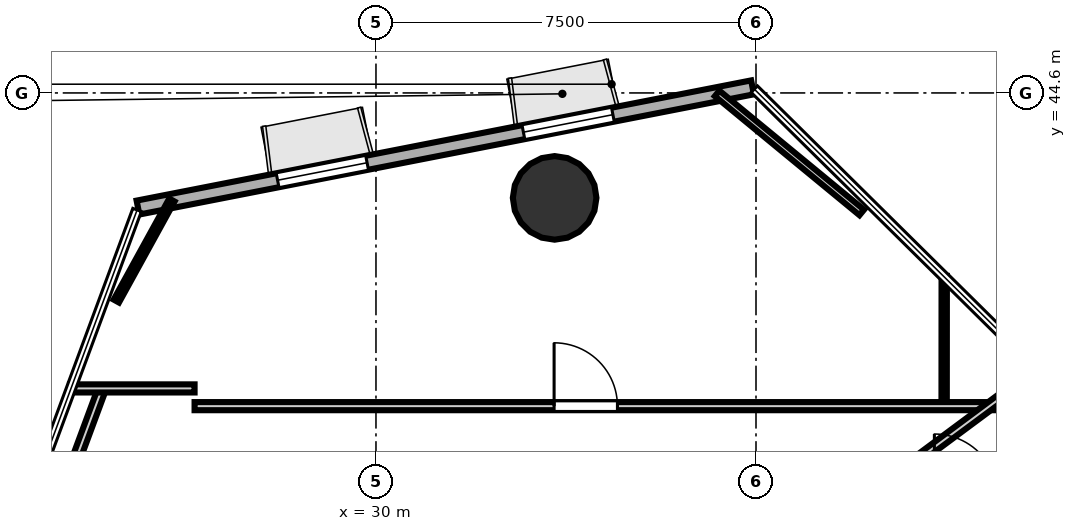
"""IFC4 building model, lengths in metres.
Left out: names, types, materials, properties, quantities, classifications, styles, units other than length and angle.
Written with IfcOpenShell. Run it as: python <this file> out.ifc"""

import sys

from ifc_helpers import new_model, si_unit, direction, frame, frame_2d, origin, origin_2d, place, context, subcontext, project, spatial, rectangle, hollow_circle, extrude, element, fill, save


model = new_model("IFC4")
c1 = context("Model", 3, precision=1e-05, world=origin(), true_north=direction((0.0, 1.0)))
c2 = subcontext(c1, "Body", "Model", "MODEL_VIEW")
j1 = project(units=[si_unit("LENGTHUNIT", "METRE"), si_unit("PLANEANGLEUNIT", "RADIAN")], contexts=[c1])
p1 = place(None, origin())
s1 = spatial("IfcSite", under=j1, at=p1, CompositionType="ELEMENT")
p2 = place(p1, origin())
s2 = spatial("IfcBuilding", under=s1, at=p2, CompositionType="ELEMENT")
p3 = place(p2, frame((0.0, 0.0, 59.9)))
s3 = spatial("IfcBuildingStorey", under=s2, at=p3, CompositionType="ELEMENT", Elevation=59.9)
p4 = place(p3, frame((33.526, 42.529, 0.0), z_axis=(0.0, 0.0, 1.0), x_axis=(1.0, 0.0, 0.0)))
e1 = element("IfcColumn", 1, at=p4, inside=s3, PredefinedType="COLUMN", context=c2, shape_type="SweptSolid", body=[
    extrude(hollow_circle(Radius=0.825, WallThickness=0.04, at=origin_2d()), origin(), (0.0, 0.0, 1.0), 3.7),
])
p5 = place(p3, frame((37.431, 44.71, 0.0), z_axis=(0.0, 0.0, 1.0), x_axis=(-0.981405358604, -0.191946664738, 0.0)))
e2 = element("IfcWall", 2, at=p5, inside=s3, PredefinedType="SOLIDWALL", context=c2, shape_type="SweptSolid", body=[
    extrude(rectangle(XDim=12.358, YDim=0.28, at=frame_2d((6.179, 0.0))), origin(), (0.0, 0.0, 1.0), 3.52),
])
p6 = place(p5, frame((2.807, 0.0, 0.85)))
e3 = element("IfcOpeningElement", 3, at=p6, cuts=e2, PredefinedType="OPENING", context=c2, shape_type="SweptSolid", body=[
    extrude(rectangle(XDim=1.8, YDim=2.1, at=frame_2d((0.9, 1.05))), frame((0.0, 0.15, 0.0), z_axis=(0.0, -1.0, 0.0), x_axis=(1.0, 0.0, 0.0)), (0.0, 0.0, 1.0), 0.3),
])
p7 = place(p5, frame((7.75, 0.0, 0.85)))
e4 = element("IfcOpeningElement", 4, at=p7, cuts=e2, PredefinedType="OPENING", context=c2, shape_type="SweptSolid", body=[
    extrude(rectangle(XDim=1.8, YDim=2.1, at=frame_2d((0.9, 1.05))), frame((0.0, 0.15, 0.0), z_axis=(0.0, -1.0, 0.0), x_axis=(1.0, 0.0, 0.0)), (0.0, 0.0, 1.0), 0.3),
])
p8 = place(p3, frame((23.579, 36.024, 0.0), z_axis=(0.0, 0.0, 1.0), x_axis=(0.347228067306, 0.93778071492, 0.0)))
e5 = element("IfcWall", 5, at=p8, inside=s3, PredefinedType="PARTITIONING", context=c2, shape_type="SweptSolid", body=[
    extrude(rectangle(XDim=2.949, YDim=0.16, at=frame_2d((1.475, 0.0))), origin(), (0.0, 0.0, 1.0), 2.84),
])
p9 = place(p3, frame((23.961, 38.769, 0.0), z_axis=(0.0, 0.0, 1.0), x_axis=(1.0, 0.0, 0.0)))
e6 = element("IfcWall", 6, at=p9, inside=s3, PredefinedType="PARTITIONING", context=c2, shape_type="SweptSolid", body=[
    extrude(rectangle(XDim=2.458, YDim=0.16, at=frame_2d((1.229, 0.0))), origin(), (0.0, 0.0, 1.0), 2.84),
])
p10 = place(p3, frame((26.42, 38.419, 0.0), z_axis=(0.0, 0.0, 1.0), x_axis=(1.0, 0.0, 0.0)))
e7 = element("IfcWall", 7, at=p10, inside=s3, PredefinedType="PARTITIONING", context=c2, shape_type="SweptSolid", body=[
    extrude(rectangle(XDim=17.395, YDim=0.16, at=frame_2d((8.697, 0.0))), origin(), (0.0, 0.0, 1.0), 2.798),
])
p11 = place(p10, frame((7.095, 0.0, 0.0)))
e8 = element("IfcOpeningElement", 8, at=p11, cuts=e7, PredefinedType="OPENING", context=c2, shape_type="SweptSolid", body=[
    extrude(rectangle(XDim=1.25, YDim=2.2, at=frame_2d((0.625, 1.1))), frame((0.0, 0.09, 0.0), z_axis=(0.0, -1.0, 0.0), x_axis=(1.0, 0.0, 0.0)), (0.0, 0.0, 1.0), 0.18),
])
p12 = place(p3, frame((43.088, 39.146, 0.0), z_axis=(0.0, 0.0, 1.0), x_axis=(-0.802821627785, -0.596219283453, 0.0)))
e9 = element("IfcWall", 9, at=p12, inside=s3, PredefinedType="PARTITIONING", context=c2, shape_type="SweptSolid", body=[
    extrude(rectangle(XDim=4.078, YDim=0.16, at=frame_2d((2.039, 0.0))), origin(), (0.0, 0.0, 1.0), 2.798),
])
p13 = place(p3, frame((41.213, 38.53, 0.0), z_axis=(0.0, 0.0, 1.0), x_axis=(0.000694857883, 0.999999758586, 0.0)))
e10 = element("IfcWall", 10, at=p13, inside=s3, PredefinedType="PARTITIONING", context=c2, shape_type="SweptSolid", body=[
    extrude(rectangle(XDim=2.459, YDim=0.105, at=frame_2d((1.23, 0.0))), origin(), (0.0, 0.0, 1.0), 2.84),
])
p14 = place(p3, frame((24.875, 40.493, 0.0), z_axis=(0.0, 0.0, 1.0), x_axis=(0.482021727928, 0.876159262808, 0.0)))
e11 = element("IfcWall", 11, at=p14, inside=s3, PredefinedType="PARTITIONING", context=c2, shape_type="SweptSolid", body=[
    extrude(rectangle(XDim=2.275, YDim=0.12, at=frame_2d((1.138, 0.0))), origin(), (0.0, 0.0, 1.0), 2.84),
])
p15 = place(p3, frame((36.733, 44.59, 0.0), z_axis=(0.0, 0.0, 1.0), x_axis=(0.772126578901, -0.635468760959, 0.0)))
e12 = element("IfcWall", 12, at=p15, inside=s3, PredefinedType="PARTITIONING", context=c2, shape_type="SweptSolid", body=[
    extrude(rectangle(XDim=3.696, YDim=0.14, at=frame_2d((1.848, 0.0))), origin(), (0.0, 0.0, 1.0), 2.84),
])
p16 = place(p11, origin())
e13 = element("IfcDoor", 13, at=p16, inside=s3, OperationType="SINGLE_SWING_LEFT", PredefinedType="DOOR", context=c2, shape_type="SweptSolid", body=[
    extrude(rectangle(XDim=1.25, YDim=2.2, at=frame_2d((0.625, 1.1))), frame((0.0, 0.025, 0.0), z_axis=(0.0, -1.0, 0.0), x_axis=(1.0, 0.0, 0.0)), (0.0, 0.0, 1.0), 0.05),
])
fill(e8, e13)
p17 = place(p6, origin())
e14 = element("IfcWindow", 14, at=p17, inside=s3, PartitioningType="SINGLE_PANEL", PredefinedType="WINDOW", context=c2, shape_type="SweptSolid", body=[
    extrude(rectangle(XDim=1.8, YDim=2.1, at=frame_2d((0.9, 1.05))), frame((0.0, 0.03, 0.0), z_axis=(0.0, -1.0, 0.0), x_axis=(1.0, 0.0, 0.0)), (0.0, 0.0, 1.0), 0.06),
])
fill(e3, e14)
p18 = place(p7, origin())
e15 = element("IfcWindow", 15, at=p18, inside=s3, PartitioningType="SINGLE_PANEL", PredefinedType="WINDOW", context=c2, shape_type="SweptSolid", body=[
    extrude(rectangle(XDim=1.8, YDim=2.1, at=frame_2d((0.9, 1.05))), frame((0.0, 0.03, 0.0), z_axis=(0.0, -1.0, 0.0), x_axis=(1.0, 0.0, 0.0)), (0.0, 0.0, 1.0), 0.06),
])
fill(e4, e15)
save(model, sys.argv[1])
